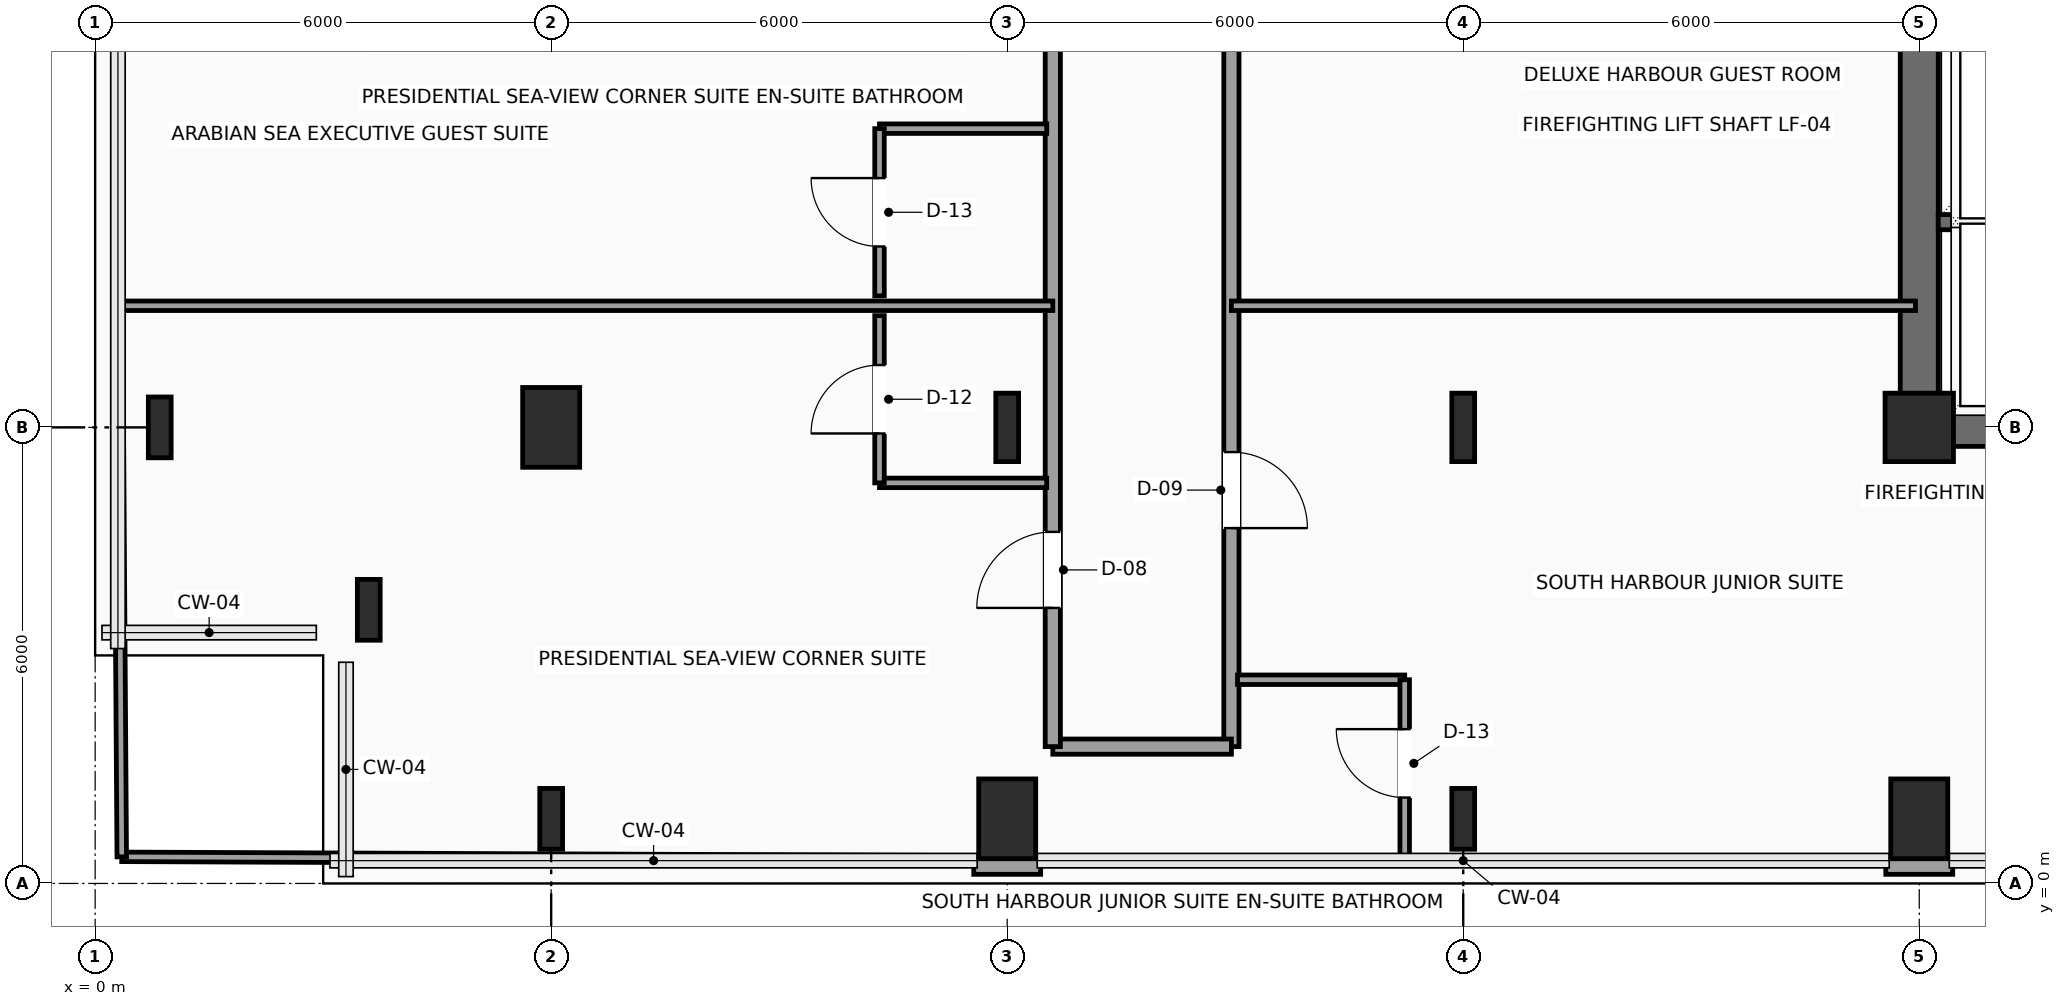
"""IFC4 building model, lengths in metres.
Left out: names, types, materials, properties, quantities, classifications, styles, units other than length and angle.
Written with IfcOpenShell. Run it as: python <this file> out.ifc"""

import sys

from ifc_helpers import new_model, si_unit, direction, frame, frame_2d, origin, origin_2d, place, context, subcontext, project, spatial, rectangle, i_section, extrude, element, fill, save


model = new_model("IFC4")
c1 = context("Model", 3, precision=1e-05, world=origin(), true_north=direction((0.0, 1.0)))
c2 = subcontext(c1, "Body", "Model", "MODEL_VIEW")
j1 = project(units=[si_unit("LENGTHUNIT", "METRE"), si_unit("PLANEANGLEUNIT", "RADIAN")], contexts=[c1])
p1 = place(None, origin())
s1 = spatial("IfcSite", under=j1, at=p1, CompositionType="ELEMENT")
p2 = place(p1, origin())
s2 = spatial("IfcBuilding", under=s1, at=p2, CompositionType="ELEMENT")
p3 = place(p2, frame((0.0, 0.0, 212.4)))
s3 = spatial("IfcBuildingStorey", under=s2, at=p3, CompositionType="ELEMENT", Elevation=212.4)
p4 = place(p3, frame((24.0, 6.0, 0.0), z_axis=(0.0, 0.0, 1.0), x_axis=(1.0, 0.0, 0.0)))
e1 = element("IfcColumn", 1, at=p4, inside=s3, PredefinedType="COLUMN", context=c2, shape_type="SweptSolid", body=[
    extrude(rectangle(XDim=0.9, YDim=0.9, at=origin_2d()), origin(), (0.0, 0.0, 1.0), 3.75),
])
for number, where, z_axis, x_axis in (
    (2, (3.6, 3.6, 0.0), (0.0, 0.0, 1.0), (1.0, 0.0, 0.0)),
    (3, (0.85, 6.0, 0.0), (0.0, 0.0, 1.0), (1.0, 0.0, 0.0)),
    (4, (6.0, 0.85, 0.0), (0.0, 0.0, 1.0), (1.0, 0.0, 0.0)),
):
    element("IfcColumn", number, at=place(p3, frame(where, z_axis=z_axis, x_axis=x_axis)), inside=s3, PredefinedType="COLUMN", context=c2, shape_type="SweptSolid", body=[
        extrude(i_section(OverallWidth=0.3, OverallDepth=0.8, WebThickness=0.018, FlangeThickness=0.033, FilletRadius=0.03, at=origin_2d()), origin(), (0.0, 0.0, 1.0), 3.75),
    ])
for number, where, z_axis, x_axis in (
    (5, (6.0, 6.0, 0.0), (0.0, 0.0, 1.0), (1.0, 0.0, 0.0)),
    (6, (12.0, 0.85, 0.0), (0.0, 0.0, 1.0), (1.0, 0.0, 0.0)),
):
    element("IfcColumn", number, at=place(p3, frame(where, z_axis=z_axis, x_axis=x_axis)), inside=s3, PredefinedType="COLUMN", context=c2, shape_type="SweptSolid", body=[
        extrude(rectangle(XDim=0.75, YDim=1.05, at=origin_2d()), origin(), (0.0, 0.0, 1.0), 3.75),
    ])
p5 = place(p3, frame((12.0, 6.0, 0.0), z_axis=(0.0, 0.0, 1.0), x_axis=(1.0, 0.0, 0.0)))
e7 = element("IfcColumn", 7, at=p5, inside=s3, PredefinedType="COLUMN", context=c2, shape_type="SweptSolid", body=[
    extrude(i_section(OverallWidth=0.3, OverallDepth=0.9, WebThickness=0.019, FlangeThickness=0.035, FilletRadius=0.03, at=origin_2d()), origin(), (0.0, 0.0, 1.0), 3.75),
])
p6 = place(p3, frame((18.0, 0.85, 0.0), z_axis=(0.0, 0.0, 1.0), x_axis=(1.0, 0.0, 0.0)))
e8 = element("IfcColumn", 8, at=p6, inside=s3, PredefinedType="COLUMN", context=c2, shape_type="SweptSolid", body=[
    extrude(i_section(OverallWidth=0.3, OverallDepth=0.8, WebThickness=0.018, FlangeThickness=0.033, FilletRadius=0.03, at=origin_2d()), origin(), (0.0, 0.0, 1.0), 3.75),
])
p7 = place(p3, frame((18.0, 6.0, 0.0), z_axis=(0.0, 0.0, 1.0), x_axis=(1.0, 0.0, 0.0)))
e9 = element("IfcColumn", 9, at=p7, inside=s3, PredefinedType="COLUMN", context=c2, shape_type="SweptSolid", body=[
    extrude(i_section(OverallWidth=0.3, OverallDepth=0.9, WebThickness=0.019, FlangeThickness=0.035, FilletRadius=0.03, at=origin_2d()), origin(), (0.0, 0.0, 1.0), 3.75),
])
p8 = place(p3, frame((24.0, 0.85, 0.0), z_axis=(0.0, 0.0, 1.0), x_axis=(1.0, 0.0, 0.0)))
e10 = element("IfcColumn", 10, at=p8, inside=s3, PredefinedType="COLUMN", context=c2, shape_type="SweptSolid", body=[
    extrude(rectangle(XDim=0.75, YDim=1.05, at=origin_2d()), origin(), (0.0, 0.0, 1.0), 3.75),
])
for number, where, z_axis, x_axis in (
    (11, (24.44, 0.24, 0.0), (0.0, 0.0, 1.0), (-1.0, 0.0, 0.0)),
    (12, (12.44, 0.24, 0.0), (0.0, 0.0, 1.0), (-1.0, 0.0, 0.0)),
):
    element("IfcWall", number, at=place(p3, frame(where, z_axis=z_axis, x_axis=x_axis)), inside=s3, PredefinedType="SOLIDWALL", context=c2, shape_type="SweptSolid", body=[
        extrude(rectangle(XDim=0.88, YDim=0.24, at=frame_2d((0.44, 0.0))), origin(), (0.0, 0.0, 1.0), 3.54),
    ])
p9 = place(p3, frame((24.0, 6.0, 0.0), z_axis=(0.0, 0.0, 1.0), x_axis=(1.0, 0.0, 0.0)))
e13 = element("IfcWall", 13, at=p9, inside=s3, PredefinedType="SHEAR", context=c2, shape_type="SweptSolid", body=[
    extrude(rectangle(XDim=9.6, YDim=0.5, at=frame_2d((4.8, 0.0))), origin(), (0.0, 0.0, 1.0), 3.54),
])
p10 = place(p3, frame((24.0, 6.0, 0.0), z_axis=(0.0, 0.0, 1.0), x_axis=(0.0, 1.0, 0.0)))
e14 = element("IfcWall", 14, at=p10, inside=s3, PredefinedType="SHEAR", context=c2, shape_type="SweptSolid", body=[
    extrude(rectangle(XDim=12.0, YDim=0.5, at=frame_2d((6.0, 0.0))), origin(), (0.0, 0.0, 1.0), 3.54),
])
p11 = place(p10, frame((7.15, 0.0, 0.0)))
e15 = element("IfcOpeningElement", 15, at=p11, cuts=e14, PredefinedType="OPENING", context=c2, shape_type="SweptSolid", body=[
    extrude(rectangle(XDim=1.6, YDim=2.3, at=frame_2d((0.8, 1.15))), frame((0.0, 0.26, 0.0), z_axis=(0.0, -1.0, 0.0), x_axis=(1.0, 0.0, 0.0)), (0.0, 0.0, 1.0), 0.52),
])
p12 = place(p3, frame((24.25, 8.7, 0.0), z_axis=(0.0, 0.0, 1.0), x_axis=(1.0, 0.0, 0.0)))
e16 = element("IfcWall", 16, at=p12, inside=s3, PredefinedType="SHEAR", context=c2, shape_type="SweptSolid", body=[
    extrude(rectangle(XDim=2.17, YDim=0.2, at=frame_2d((1.085, 0.0))), origin(), (0.0, 0.0, 1.0), 3.54),
])
p13 = place(p3, frame((14.95, 14.55, 0.0), z_axis=(0.0, 0.0, 1.0), x_axis=(0.0, -1.0, 0.0)))
e17 = element("IfcWall", 17, at=p13, inside=s3, PredefinedType="PARTITIONING", context=c2, shape_type="SweptSolid", body=[
    extrude(rectangle(XDim=12.75, YDim=0.2, at=frame_2d((6.375, 0.0))), origin(), (0.0, 0.0, 1.0), 3.54),
])
p14 = place(p13, frame((8.875, 0.0, 0.0)))
e18 = element("IfcOpeningElement", 18, at=p14, cuts=e17, PredefinedType="OPENING", context=c2, shape_type="SweptSolid", body=[
    extrude(rectangle(XDim=1.0, YDim=2.2, at=frame_2d((0.5, 1.1))), frame((0.0, 0.11, 0.0), z_axis=(0.0, -1.0, 0.0), x_axis=(1.0, 0.0, 0.0)), (0.0, 0.0, 1.0), 0.22),
])
p15 = place(p3, frame((14.95, 1.8, 0.0), z_axis=(0.0, 0.0, 1.0), x_axis=(-1.0, 0.0, 0.0)))
e19 = element("IfcWall", 19, at=p15, inside=s3, PredefinedType="PARTITIONING", context=c2, shape_type="SweptSolid", body=[
    extrude(rectangle(XDim=2.35, YDim=0.2, at=frame_2d((1.175, 0.0))), origin(), (0.0, 0.0, 1.0), 3.54),
])
p16 = place(p3, frame((12.6, 1.8, 0.0), z_axis=(0.0, 0.0, 1.0), x_axis=(0.0, 1.0, 0.0)))
e20 = element("IfcWall", 20, at=p16, inside=s3, PredefinedType="PARTITIONING", context=c2, shape_type="SweptSolid", body=[
    extrude(rectangle(XDim=12.75, YDim=0.2, at=frame_2d((6.375, 0.0))), origin(), (0.0, 0.0, 1.0), 3.54),
])
p17 = place(p16, frame((1.825, 0.0, 0.0)))
e21 = element("IfcOpeningElement", 21, at=p17, cuts=e20, PredefinedType="OPENING", context=c2, shape_type="SweptSolid", body=[
    extrude(rectangle(XDim=1.0, YDim=2.2, at=frame_2d((0.5, 1.1))), frame((0.0, 0.11, 0.0), z_axis=(0.0, -1.0, 0.0), x_axis=(1.0, 0.0, 0.0)), (0.0, 0.0, 1.0), 0.22),
])
p18 = place(p16, frame((10.98, 0.0, 0.0)))
e22 = element("IfcOpeningElement", 22, at=p18, cuts=e20, PredefinedType="OPENING", context=c2, shape_type="SweptSolid", body=[
    extrude(rectangle(XDim=1.0, YDim=2.2, at=frame_2d((0.5, 1.1))), frame((0.0, 0.11, 0.0), z_axis=(0.0, -1.0, 0.0), x_axis=(1.0, 0.0, 0.0)), (0.0, 0.0, 1.0), 0.22),
])
p19 = place(p3, frame((0.35, 0.35, 0.0), z_axis=(0.0, 0.0, 1.0), x_axis=(0.999991617913, -0.004094398993, 0.0)))
e23 = element("IfcWall", 23, at=p19, inside=s3, PredefinedType="PARTITIONING", context=c2, shape_type="SweptSolid", body=[
    extrude(rectangle(XDim=11.21, YDim=0.125, at=frame_2d((5.605, 0.0))), origin(), (0.0, 0.0, 1.0), 3.54),
])
p20 = place(p3, frame((0.3, 7.6, 0.0), z_axis=(0.0, 0.0, 1.0), x_axis=(1.0, 0.0, 0.0)))
e24 = element("IfcWall", 24, at=p20, inside=s3, PredefinedType="PARTITIONING", context=c2, shape_type="SweptSolid", body=[
    extrude(rectangle(XDim=12.3, YDim=0.125, at=frame_2d((6.15, 0.0))), origin(), (0.0, 0.0, 1.0), 3.54),
])
p21 = place(p3, frame((0.35, 0.35, 0.0), z_axis=(0.0, 0.0, 1.0), x_axis=(-0.006903122154, 0.999976173168, 0.0)))
e25 = element("IfcWall", 25, at=p21, inside=s3, PredefinedType="PARTITIONING", context=c2, shape_type="SweptSolid", body=[
    extrude(rectangle(XDim=7.25, YDim=0.125, at=frame_2d((3.625, 0.0))), origin(), (0.0, 0.0, 1.0), 3.54),
])
p22 = place(p3, frame((10.32, 5.27, 0.0), z_axis=(0.0, 0.0, 1.0), x_axis=(1.0, 0.0, 0.0)))
e26 = element("IfcWall", 26, at=p22, inside=s3, PredefinedType="PARTITIONING", context=c2, shape_type="SweptSolid", body=[
    extrude(rectangle(XDim=2.2, YDim=0.125, at=frame_2d((1.1, 0.0))), origin(), (0.0, 0.0, 1.0), 3.54),
])
p23 = place(p3, frame((10.32, 5.27, 0.0), z_axis=(0.0, 0.0, 1.0), x_axis=(0.0, 1.0, 0.0)))
e27 = element("IfcWall", 27, at=p23, inside=s3, PredefinedType="PARTITIONING", context=c2, shape_type="SweptSolid", body=[
    extrude(rectangle(XDim=2.2, YDim=0.125, at=frame_2d((1.1, 0.0))), origin(), (0.0, 0.0, 1.0), 3.54),
])
p24 = place(p23, frame((0.65, 0.0, 0.0)))
e28 = element("IfcOpeningElement", 28, at=p24, cuts=e27, PredefinedType="OPENING", context=c2, shape_type="SweptSolid", body=[
    extrude(rectangle(XDim=0.9, YDim=2.1, at=frame_2d((0.45, 1.05))), frame((0.0, 0.073, 0.0), z_axis=(0.0, -1.0, 0.0), x_axis=(1.0, 0.0, 0.0)), (0.0, 0.0, 1.0), 0.145),
])
p25 = place(p3, frame((10.32, 9.93, 0.0), z_axis=(0.0, 0.0, 1.0), x_axis=(1.0, 0.0, 0.0)))
e29 = element("IfcWall", 29, at=p25, inside=s3, PredefinedType="PARTITIONING", context=c2, shape_type="SweptSolid", body=[
    extrude(rectangle(XDim=2.2, YDim=0.125, at=frame_2d((1.1, 0.0))), origin(), (0.0, 0.0, 1.0), 3.54),
])
p26 = place(p3, frame((10.32, 7.73, 0.0), z_axis=(0.0, 0.0, 1.0), x_axis=(0.0, 1.0, 0.0)))
e30 = element("IfcWall", 30, at=p26, inside=s3, PredefinedType="PARTITIONING", context=c2, shape_type="SweptSolid", body=[
    extrude(rectangle(XDim=2.2, YDim=0.125, at=frame_2d((1.1, 0.0))), origin(), (0.0, 0.0, 1.0), 3.54),
])
p27 = place(p26, frame((0.65, 0.0, 0.0)))
e31 = element("IfcOpeningElement", 31, at=p27, cuts=e30, PredefinedType="OPENING", context=c2, shape_type="SweptSolid", body=[
    extrude(rectangle(XDim=0.9, YDim=2.1, at=frame_2d((0.45, 1.05))), frame((0.0, 0.073, 0.0), z_axis=(0.0, -1.0, 0.0), x_axis=(1.0, 0.0, 0.0)), (0.0, 0.0, 1.0), 0.145),
])
p28 = place(p3, frame((14.95, 7.6, 0.0), z_axis=(0.0, 0.0, 1.0), x_axis=(1.0, 0.0, 0.0)))
e32 = element("IfcWall", 32, at=p28, inside=s3, PredefinedType="PARTITIONING", context=c2, shape_type="SweptSolid", body=[
    extrude(rectangle(XDim=9.0, YDim=0.125, at=frame_2d((4.5, 0.0))), origin(), (0.0, 0.0, 1.0), 3.54),
])
p29 = place(p3, frame((15.03, 2.68, 0.0), z_axis=(0.0, 0.0, 1.0), x_axis=(1.0, 0.0, 0.0)))
e33 = element("IfcWall", 33, at=p29, inside=s3, PredefinedType="PARTITIONING", context=c2, shape_type="SweptSolid", body=[
    extrude(rectangle(XDim=2.2, YDim=0.125, at=frame_2d((1.1, 0.0))), origin(), (0.0, 0.0, 1.0), 3.54),
])
p30 = place(p3, frame((17.23, 0.3, 0.0), z_axis=(0.0, 0.0, 1.0), x_axis=(0.0, 1.0, 0.0)))
e34 = element("IfcWall", 34, at=p30, inside=s3, PredefinedType="PARTITIONING", context=c2, shape_type="SweptSolid", body=[
    extrude(rectangle(XDim=2.38, YDim=0.125, at=frame_2d((1.19, 0.0))), origin(), (0.0, 0.0, 1.0), 3.54),
])
p31 = place(p30, frame((0.83, 0.0, 0.0)))
e35 = element("IfcOpeningElement", 35, at=p31, cuts=e34, PredefinedType="OPENING", context=c2, shape_type="SweptSolid", body=[
    extrude(rectangle(XDim=0.9, YDim=2.1, at=frame_2d((0.45, 1.05))), frame((0.0, 0.073, 0.0), z_axis=(0.0, -1.0, 0.0), x_axis=(1.0, 0.0, 0.0)), (0.0, 0.0, 1.0), 0.145),
])
p32 = place(p14, origin())
e36 = element("IfcDoor", 36, at=p32, inside=s3, OperationType="SINGLE_SWING_RIGHT", PredefinedType="DOOR", context=c2, shape_type="SweptSolid", body=[
    extrude(rectangle(XDim=1.0, YDim=2.2, at=frame_2d((0.5, 1.1))), frame((0.0, 0.025, 0.0), z_axis=(0.0, -1.0, 0.0), x_axis=(1.0, 0.0, 0.0)), (0.0, 0.0, 1.0), 0.05),
])
fill(e18, e36)
p33 = place(p17, origin())
e37 = element("IfcDoor", 37, at=p33, inside=s3, OperationType="SINGLE_SWING_LEFT", PredefinedType="DOOR", context=c2, shape_type="SweptSolid", body=[
    extrude(rectangle(XDim=1.0, YDim=2.2, at=frame_2d((0.5, 1.1))), frame((0.0, 0.025, 0.0), z_axis=(0.0, -1.0, 0.0), x_axis=(1.0, 0.0, 0.0)), (0.0, 0.0, 1.0), 0.05),
])
fill(e21, e37)
p34 = place(p24, origin())
e38 = element("IfcDoor", 38, at=p34, inside=s3, OperationType="SINGLE_SWING_LEFT", PredefinedType="DOOR", context=c2, shape_type="SweptSolid", body=[
    extrude(rectangle(XDim=0.9, YDim=2.1, at=frame_2d((0.45, 1.05))), frame((0.0, 0.025, 0.0), z_axis=(0.0, -1.0, 0.0), x_axis=(1.0, 0.0, 0.0)), (0.0, 0.0, 1.0), 0.05),
])
fill(e28, e38)
p35 = place(p27, origin())
e39 = element("IfcDoor", 39, at=p35, inside=s3, OperationType="SINGLE_SWING_RIGHT", PredefinedType="DOOR", context=c2, shape_type="SweptSolid", body=[
    extrude(rectangle(XDim=0.9, YDim=2.1, at=frame_2d((0.45, 1.05))), frame((0.0, 0.025, 0.0), z_axis=(0.0, -1.0, 0.0), x_axis=(1.0, 0.0, 0.0)), (0.0, 0.0, 1.0), 0.05),
])
fill(e31, e39)
p36 = place(p31, origin())
e40 = element("IfcDoor", 40, at=p36, inside=s3, OperationType="SINGLE_SWING_RIGHT", PredefinedType="DOOR", context=c2, shape_type="SweptSolid", body=[
    extrude(rectangle(XDim=0.9, YDim=2.1, at=frame_2d((0.45, 1.05))), frame((0.0, 0.025, 0.0), z_axis=(0.0, -1.0, 0.0), x_axis=(1.0, 0.0, 0.0)), (0.0, 0.0, 1.0), 0.05),
])
fill(e35, e40)
save(model, sys.argv[1])
